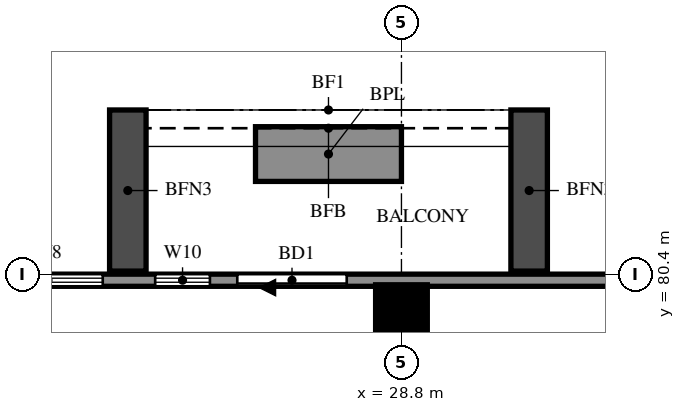
"""IFC4 building model, lengths in metres.
Left out: names, types, materials, properties, quantities, classifications, styles, units other than length and angle.
Written with IfcOpenShell. Run it as: python <this file> out.ifc"""

import sys

from ifc_helpers import new_model, si_unit, direction, frame, frame_2d, origin, origin_2d, place, context, subcontext, project, spatial, rectangle, extrude, source, transform, mapped, element, fill, save


model = new_model("IFC4")
c1 = context("Model", 3, precision=1e-05, world=origin(), true_north=direction((0.0, 1.0)))
c2 = subcontext(c1, "Body", "Model", "MODEL_VIEW")
j1 = project(units=[si_unit("LENGTHUNIT", "METRE"), si_unit("PLANEANGLEUNIT", "RADIAN")], contexts=[c1])
p1 = place(None, origin())
s1 = spatial("IfcSite", under=j1, at=p1, CompositionType="ELEMENT")
p2 = place(p1, origin())
s2 = spatial("IfcBuilding", under=s1, at=p2, CompositionType="ELEMENT")
p3 = place(p2, frame((0.0, 0.0, 146.5)))
s3 = spatial("IfcBuildingStorey", under=s2, at=p3, CompositionType="ELEMENT", Elevation=146.5)
m1 = source(origin(), c2, "Body", "SweptSolid", [
    extrude(rectangle(XDim=0.85, YDim=0.85, at=origin_2d()), origin(), (0.0, 0.0, 1.0), 3.2),
])
p4 = place(p3, frame((28.8, 79.8, 0.0), z_axis=(0.0, 0.0, 1.0), x_axis=(1.0, 0.0, 0.0)))
e1 = element("IfcColumn", 1, at=p4, inside=s3, PredefinedType="COLUMN", context=c2, shape_type="MappedRepresentation", body=[
    mapped(m1, transform((0.0, 0.0, 0.0))),
])
p5 = place(p3, frame((82.6, 80.3, 0.0), z_axis=(0.0, 0.0, 1.0), x_axis=(-1.0, 0.0, 0.0)))
e2 = element("IfcWall", 2, at=p5, inside=s3, PredefinedType="SOLIDWALL", context=c2, shape_type="SweptSolid", body=[
    extrude(rectangle(XDim=64.6, YDim=0.2, at=frame_2d((32.3, 0.0))), origin(), (0.0, 0.0, 1.0), 3.2),
])
p6 = place(p5, frame((54.7, 0.0, 0.0)))
e3 = element("IfcOpeningElement", 3, at=p6, cuts=e2, PredefinedType="OPENING", context=c2, shape_type="SweptSolid", body=[
    extrude(rectangle(XDim=1.8, YDim=2.4, at=frame_2d((0.9, 1.2))), frame((0.0, 0.11, 0.0), z_axis=(0.0, -1.0, 0.0), x_axis=(1.0, 0.0, 0.0)), (0.0, 0.0, 1.0), 0.22),
])
p7 = place(p5, frame((56.95, 0.0, 0.6)))
e4 = element("IfcOpeningElement", 4, at=p7, cuts=e2, PredefinedType="OPENING", context=c2, shape_type="SweptSolid", body=[
    extrude(rectangle(XDim=0.9, YDim=2.4, at=frame_2d((0.45, 1.2))), frame((0.0, 0.11, 0.0), z_axis=(0.0, -1.0, 0.0), x_axis=(1.0, 0.0, 0.0)), (0.0, 0.0, 1.0), 0.22),
])
p8 = place(p5, frame((58.712, 0.0, 0.6)))
e5 = element("IfcOpeningElement", 5, at=p8, cuts=e2, PredefinedType="OPENING", context=c2, shape_type="SweptSolid", body=[
    extrude(rectangle(XDim=1.8, YDim=2.4, at=frame_2d((0.9, 1.2))), frame((0.0, 0.11, 0.0), z_axis=(0.0, -1.0, 0.0), x_axis=(1.0, 0.0, 0.0)), (0.0, 0.0, 1.0), 0.22),
])
p9 = place(p5, frame((61.988, 0.0, 0.6)))
e6 = element("IfcOpeningElement", 6, at=p9, cuts=e2, PredefinedType="OPENING", context=c2, shape_type="SweptSolid", body=[
    extrude(rectangle(XDim=1.8, YDim=2.4, at=frame_2d((0.9, 1.2))), frame((0.0, 0.11, 0.0), z_axis=(0.0, -1.0, 0.0), x_axis=(1.0, 0.0, 0.0)), (0.0, 0.0, 1.0), 0.22),
])
p10 = place(p5, frame((0.712, 0.0, 0.6)))
e7 = element("IfcOpeningElement", 7, at=p10, cuts=e2, PredefinedType="OPENING", context=c2, shape_type="SweptSolid", body=[
    extrude(rectangle(XDim=1.8, YDim=2.4, at=frame_2d((0.9, 1.2))), frame((0.0, 0.11, 0.0), z_axis=(0.0, -1.0, 0.0), x_axis=(1.0, 0.0, 0.0)), (0.0, 0.0, 1.0), 0.22),
])
p11 = place(p5, frame((4.358, 0.0, 0.6)))
e8 = element("IfcOpeningElement", 8, at=p11, cuts=e2, PredefinedType="OPENING", context=c2, shape_type="SweptSolid", body=[
    extrude(rectangle(XDim=2.4, YDim=2.4, at=frame_2d((1.2, 1.2))), frame((0.0, 0.11, 0.0), z_axis=(0.0, -1.0, 0.0), x_axis=(1.0, 0.0, 0.0)), (0.0, 0.0, 1.0), 0.22),
])
p12 = place(p5, frame((7.242, 0.0, 0.6)))
e9 = element("IfcOpeningElement", 9, at=p12, cuts=e2, PredefinedType="OPENING", context=c2, shape_type="SweptSolid", body=[
    extrude(rectangle(XDim=2.4, YDim=2.4, at=frame_2d((1.2, 1.2))), frame((0.0, 0.11, 0.0), z_axis=(0.0, -1.0, 0.0), x_axis=(1.0, 0.0, 0.0)), (0.0, 0.0, 1.0), 0.22),
])
for number, where, z_axis, x_axis in (
    (10, (30.9, 80.45, 0.0), (0.0, 0.0, 1.0), (0.0, 1.0, 0.0)),
    (11, (24.3, 80.45, 0.0), (0.0, 0.0, 1.0), (0.0, 1.0, 0.0)),
):
    element("IfcWall", number, at=place(p3, frame(where, z_axis=z_axis, x_axis=x_axis)), inside=s3, PredefinedType="SOLIDWALL", context=c2, shape_type="SweptSolid", body=[
        extrude(rectangle(XDim=2.65, YDim=0.6, at=frame_2d((1.325, 0.0))), origin(), (0.0, 0.0, 1.0), 2.85),
    ])
p13 = place(p3, frame((28.8, 82.375, 0.0), z_axis=(0.0, 0.0, 1.0), x_axis=(-1.0, 0.0, 0.0)))
e12 = element("IfcWall", 12, at=p13, inside=s3, PredefinedType="SOLIDWALL", context=c2, shape_type="SweptSolid", body=[
    extrude(rectangle(XDim=2.4, YDim=0.9, at=frame_2d((1.2, 0.0))), origin(), (0.0, 0.0, 1.0), 0.9),
])
p14 = place(p6, origin())
e13 = element("IfcDoor", 13, at=p14, inside=s3, OperationType="DOUBLE_DOOR_SLIDING", PredefinedType="DOOR", context=c2, shape_type="SweptSolid", body=[
    extrude(rectangle(XDim=1.8, YDim=2.4, at=frame_2d((0.9, 1.2))), frame((0.0, 0.025, 0.0), z_axis=(0.0, -1.0, 0.0), x_axis=(1.0, 0.0, 0.0)), (0.0, 0.0, 1.0), 0.05),
])
fill(e3, e13)
p15 = place(p7, origin())
e14 = element("IfcWindow", 14, at=p15, inside=s3, PartitioningType="SINGLE_PANEL", PredefinedType="WINDOW", context=c2, shape_type="SweptSolid", body=[
    extrude(rectangle(XDim=0.9, YDim=2.4, at=frame_2d((0.45, 1.2))), frame((0.0, 0.03, 0.0), z_axis=(0.0, -1.0, 0.0), x_axis=(1.0, 0.0, 0.0)), (0.0, 0.0, 1.0), 0.06),
])
fill(e4, e14)
p16 = place(p8, origin())
e15 = element("IfcWindow", 15, at=p16, inside=s3, PartitioningType="DOUBLE_PANEL_VERTICAL", PredefinedType="WINDOW", context=c2, shape_type="SweptSolid", body=[
    extrude(rectangle(XDim=1.8, YDim=2.4, at=frame_2d((0.9, 1.2))), frame((0.0, 0.03, 0.0), z_axis=(0.0, -1.0, 0.0), x_axis=(1.0, 0.0, 0.0)), (0.0, 0.0, 1.0), 0.06),
])
fill(e5, e15)
save(model, sys.argv[1])
